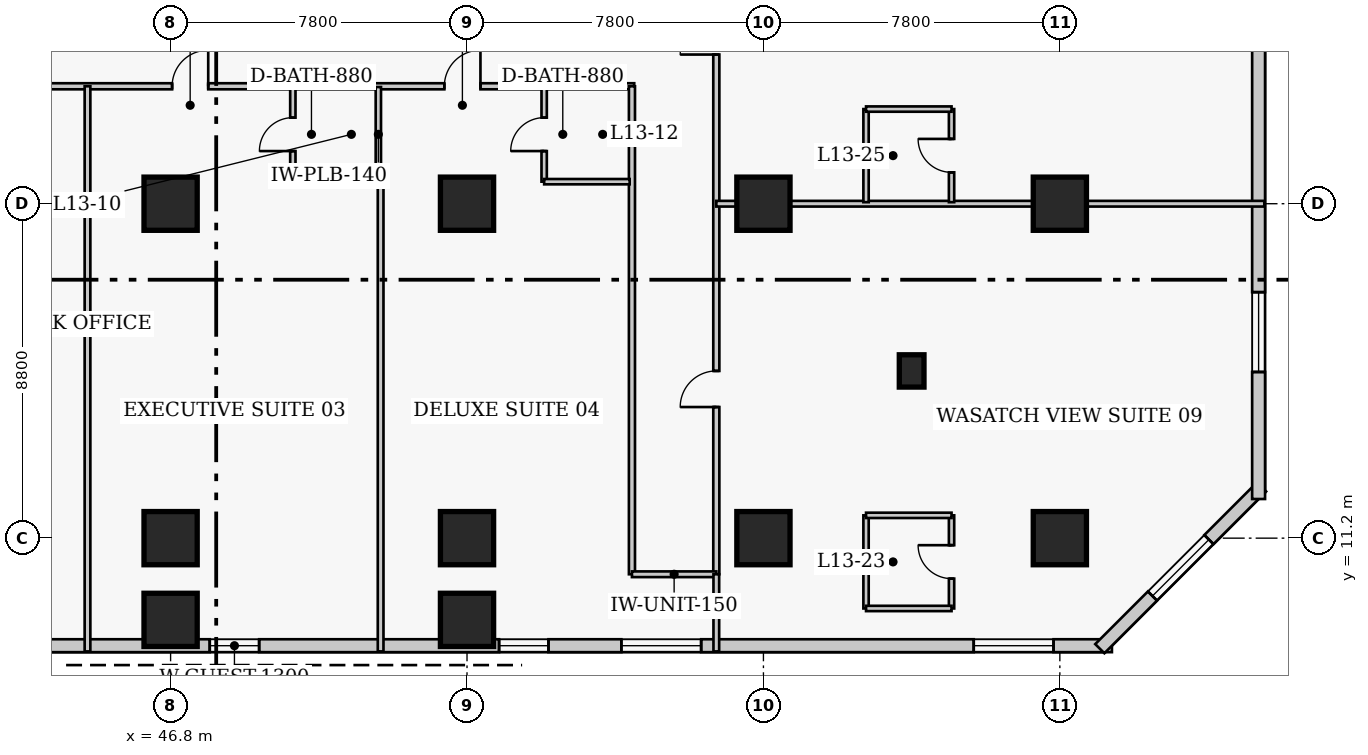
"""IFC4 building model, lengths in metres.
Left out: names, types, materials, properties, quantities, classifications, styles, units other than length and angle.
Written with IfcOpenShell. Run it as: python <this file> out.ifc"""

import sys

from ifc_helpers import new_model, si_unit, direction, frame, frame_2d, origin, origin_2d, place, context, subcontext, project, spatial, rectangle, extrude, element, fill, save


model = new_model("IFC4")
c1 = context("Model", 3, precision=1e-05, world=origin(), true_north=direction((0.0, 1.0)))
c2 = subcontext(c1, "Body", "Model", "MODEL_VIEW")
j1 = project(units=[si_unit("LENGTHUNIT", "METRE"), si_unit("PLANEANGLEUNIT", "RADIAN")], contexts=[c1])
p1 = place(None, origin())
s1 = spatial("IfcSite", under=j1, at=p1, CompositionType="ELEMENT")
p2 = place(p1, origin())
s2 = spatial("IfcBuilding", under=s1, at=p2, CompositionType="ELEMENT")
p3 = place(p2, frame((0.0, 0.0, 56.4)))
s3 = spatial("IfcBuildingStorey", under=s2, at=p3, CompositionType="ELEMENT", Elevation=56.4)
for number, where, z_axis, x_axis in (
    (1, (46.8, 11.2, 0.0), (0.0, 0.0, 1.0), (1.0, 0.0, 0.0)),
    (2, (46.8, 20.0, 0.0), (0.0, 0.0, 1.0), (1.0, 0.0, 0.0)),
    (3, (54.6, 11.2, 0.0), (0.0, 0.0, 1.0), (1.0, 0.0, 0.0)),
    (4, (54.6, 20.0, 0.0), (0.0, 0.0, 1.0), (1.0, 0.0, 0.0)),
    (5, (62.4, 11.2, 0.0), (0.0, 0.0, 1.0), (1.0, 0.0, 0.0)),
    (6, (62.4, 20.0, 0.0), (0.0, 0.0, 1.0), (1.0, 0.0, 0.0)),
    (7, (70.2, 11.2, 0.0), (0.0, 0.0, 1.0), (1.0, 0.0, 0.0)),
    (8, (70.2, 20.0, 0.0), (0.0, 0.0, 1.0), (1.0, 0.0, 0.0)),
    (9, (46.8, 9.05, 0.0), (0.0, 0.0, 1.0), (1.0, 0.0, 0.0)),
    (10, (54.6, 9.05, 0.0), (0.0, 0.0, 1.0), (1.0, 0.0, 0.0)),
):
    element("IfcColumn", number, at=place(p3, frame(where, z_axis=z_axis, x_axis=x_axis)), inside=s3, PredefinedType="COLUMN", context=c2, shape_type="SweptSolid", body=[
        extrude(rectangle(XDim=1.4, YDim=1.4, at=origin_2d()), origin(), (0.0, 0.0, 1.0), 3.8),
    ])
p4 = place(p3, frame((66.3, 15.6, 0.0), z_axis=(0.0, 0.0, 1.0), x_axis=(1.0, 0.0, 0.0)))
e11 = element("IfcColumn", 11, at=p4, inside=s3, PredefinedType="PILASTER", context=c2, shape_type="SweptSolid", body=[
    extrude(rectangle(XDim=0.65, YDim=0.85, at=origin_2d()), origin(), (0.0, 0.0, 1.0), 3.8),
])
p5 = place(p3, frame((41.68, 8.37, 0.0), z_axis=(0.0, 0.0, 1.0), x_axis=(1.0, 0.0, 0.0)))
e12 = element("IfcWall", 12, at=p5, inside=s3, PredefinedType="SOLIDWALL", context=c2, shape_type="SweptSolid", body=[
    extrude(rectangle(XDim=29.89, YDim=0.34, at=frame_2d((14.945, 0.0))), origin(), (0.0, 0.0, 1.0), 3.54),
])
p6 = place(p5, frame((16.981, 0.0, 0.85)))
e13 = element("IfcOpeningElement", 13, at=p6, cuts=e12, PredefinedType="OPENING", context=c2, shape_type="SweptSolid", body=[
    extrude(rectangle(XDim=2.1, YDim=1.85, at=frame_2d((1.05, 0.925))), frame((0.0, 0.18, 0.0), z_axis=(0.0, -1.0, 0.0), x_axis=(1.0, 0.0, 0.0)), (0.0, 0.0, 1.0), 0.36),
])
p7 = place(p5, frame((26.254, 0.0, 0.85)))
e14 = element("IfcOpeningElement", 14, at=p7, cuts=e12, PredefinedType="OPENING", context=c2, shape_type="SweptSolid", body=[
    extrude(rectangle(XDim=2.1, YDim=1.85, at=frame_2d((1.05, 0.925))), frame((0.0, 0.18, 0.0), z_axis=(0.0, -1.0, 0.0), x_axis=(1.0, 0.0, 0.0)), (0.0, 0.0, 1.0), 0.36),
])
p8 = place(p5, frame((6.15, 0.0, 0.85)))
e15 = element("IfcOpeningElement", 15, at=p8, cuts=e12, PredefinedType="OPENING", context=c2, shape_type="SweptSolid", body=[
    extrude(rectangle(XDim=1.3, YDim=1.7, at=frame_2d((0.65, 0.85))), frame((0.0, 0.18, 0.0), z_axis=(0.0, -1.0, 0.0), x_axis=(1.0, 0.0, 0.0)), (0.0, 0.0, 1.0), 0.36),
])
p9 = place(p5, frame((13.763, 0.0, 0.85)))
e16 = element("IfcOpeningElement", 16, at=p9, cuts=e12, PredefinedType="OPENING", context=c2, shape_type="SweptSolid", body=[
    extrude(rectangle(XDim=1.3, YDim=1.7, at=frame_2d((0.65, 0.85))), frame((0.0, 0.18, 0.0), z_axis=(0.0, -1.0, 0.0), x_axis=(1.0, 0.0, 0.0)), (0.0, 0.0, 1.0), 0.36),
])
p10 = place(p3, frame((71.251, 8.292, 0.0), z_axis=(0.0, 0.0, 1.0), x_axis=(0.707106781187, 0.707106781187, 0.0)))
e17 = element("IfcWall", 17, at=p10, inside=s3, PredefinedType="SOLIDWALL", context=c2, shape_type="SweptSolid", body=[
    extrude(rectangle(XDim=6.02, YDim=0.34, at=frame_2d((3.01, 0.0))), origin(), (0.0, 0.0, 1.0), 3.54),
])
p11 = place(p10, frame((1.96, 0.0, 0.85)))
e18 = element("IfcOpeningElement", 18, at=p11, cuts=e17, PredefinedType="OPENING", context=c2, shape_type="SweptSolid", body=[
    extrude(rectangle(XDim=2.1, YDim=1.85, at=frame_2d((1.05, 0.925))), frame((0.0, 0.18, 0.0), z_axis=(0.0, -1.0, 0.0), x_axis=(1.0, 0.0, 0.0)), (0.0, 0.0, 1.0), 0.36),
])
p12 = place(p3, frame((75.43, 12.23, 0.0), z_axis=(0.0, 0.0, 1.0), x_axis=(0.0, 1.0, 0.0)))
e19 = element("IfcWall", 19, at=p12, inside=s3, PredefinedType="SOLIDWALL", context=c2, shape_type="SweptSolid", body=[
    extrude(rectangle(XDim=35.14, YDim=0.34, at=frame_2d((17.57, 0.0))), origin(), (0.0, 0.0, 1.0), 3.54),
])
p13 = place(p12, frame((3.343, 0.0, 0.85)))
e20 = element("IfcOpeningElement", 20, at=p13, cuts=e19, PredefinedType="OPENING", context=c2, shape_type="SweptSolid", body=[
    extrude(rectangle(XDim=2.1, YDim=1.85, at=frame_2d((1.05, 0.925))), frame((0.0, 0.18, 0.0), z_axis=(0.0, -1.0, 0.0), x_axis=(1.0, 0.0, 0.0)), (0.0, 0.0, 1.0), 0.36),
])
p14 = place(p12, frame((12.127, 0.0, 0.85)))
e21 = element("IfcOpeningElement", 21, at=p14, cuts=e19, PredefinedType="OPENING", context=c2, shape_type="SweptSolid", body=[
    extrude(rectangle(XDim=2.1, YDim=1.85, at=frame_2d((1.05, 0.925))), frame((0.0, 0.18, 0.0), z_axis=(0.0, -1.0, 0.0), x_axis=(1.0, 0.0, 0.0)), (0.0, 0.0, 1.0), 0.36),
])
p15 = place(p12, frame((20.913, 0.0, 0.85)))
e22 = element("IfcOpeningElement", 22, at=p15, cuts=e19, PredefinedType="OPENING", context=c2, shape_type="SweptSolid", body=[
    extrude(rectangle(XDim=2.1, YDim=1.85, at=frame_2d((1.05, 0.925))), frame((0.0, 0.18, 0.0), z_axis=(0.0, -1.0, 0.0), x_axis=(1.0, 0.0, 0.0)), (0.0, 0.0, 1.0), 0.36),
])
p16 = place(p12, frame((29.698, 0.0, 0.85)))
e23 = element("IfcOpeningElement", 23, at=p16, cuts=e19, PredefinedType="OPENING", context=c2, shape_type="SweptSolid", body=[
    extrude(rectangle(XDim=2.1, YDim=1.85, at=frame_2d((1.05, 0.925))), frame((0.0, 0.18, 0.0), z_axis=(0.0, -1.0, 0.0), x_axis=(1.0, 0.0, 0.0)), (0.0, 0.0, 1.0), 0.36),
])
p17 = place(p3, frame((35.8, 23.09, 0.0), z_axis=(0.0, 0.0, 1.0), x_axis=(1.0, 0.0, 0.0)))
e24 = element("IfcWall", 24, at=p17, inside=s3, PredefinedType="PARTITIONING", context=c2, shape_type="SweptSolid", body=[
    extrude(rectangle(XDim=23.2, YDim=0.16, at=frame_2d((11.6, 0.0))), origin(), (0.0, 0.0, 1.0), 3.54),
])
p18 = place(p17, frame((3.907, 0.0, 0.0)))
e25 = element("IfcOpeningElement", 25, at=p18, cuts=e24, PredefinedType="OPENING", context=c2, shape_type="SweptSolid", body=[
    extrude(rectangle(XDim=1.0, YDim=2.15, at=frame_2d((0.5, 1.075))), frame((0.0, 0.09, 0.0), z_axis=(0.0, -1.0, 0.0), x_axis=(1.0, 0.0, 0.0)), (0.0, 0.0, 1.0), 0.18),
])
p19 = place(p17, frame((11.04, 0.0, 0.0)))
e26 = element("IfcOpeningElement", 26, at=p19, cuts=e24, PredefinedType="OPENING", context=c2, shape_type="SweptSolid", body=[
    extrude(rectangle(XDim=0.95, YDim=2.1, at=frame_2d((0.475, 1.05))), frame((0.0, 0.09, 0.0), z_axis=(0.0, -1.0, 0.0), x_axis=(1.0, 0.0, 0.0)), (0.0, 0.0, 1.0), 0.18),
])
p20 = place(p17, frame((18.203, 0.0, 0.0)))
e27 = element("IfcOpeningElement", 27, at=p20, cuts=e24, PredefinedType="OPENING", context=c2, shape_type="SweptSolid", body=[
    extrude(rectangle(XDim=0.95, YDim=2.1, at=frame_2d((0.475, 1.05))), frame((0.0, 0.09, 0.0), z_axis=(0.0, -1.0, 0.0), x_axis=(1.0, 0.0, 0.0)), (0.0, 0.0, 1.0), 0.18),
])
p21 = place(p3, frame((61.16, 10.25, 0.0), z_axis=(0.0, 0.0, 1.0), x_axis=(0.0, 1.0, 0.0)))
e28 = element("IfcWall", 28, at=p21, inside=s3, PredefinedType="PARTITIONING", context=c2, shape_type="SweptSolid", body=[
    extrude(rectangle(XDim=30.4, YDim=0.16, at=frame_2d((15.2, 0.0))), origin(), (0.0, 0.0, 1.0), 3.54),
])
p22 = place(p21, frame((4.4, 0.0, 0.0)))
e29 = element("IfcOpeningElement", 29, at=p22, cuts=e28, PredefinedType="OPENING", context=c2, shape_type="SweptSolid", body=[
    extrude(rectangle(XDim=0.95, YDim=2.1, at=frame_2d((0.475, 1.05))), frame((0.0, 0.09, 0.0), z_axis=(0.0, -1.0, 0.0), x_axis=(1.0, 0.0, 0.0)), (0.0, 0.0, 1.0), 0.18),
])
p23 = place(p21, frame((13.675, 0.0, 0.0)))
e30 = element("IfcOpeningElement", 30, at=p23, cuts=e28, PredefinedType="OPENING", context=c2, shape_type="SweptSolid", body=[
    extrude(rectangle(XDim=0.95, YDim=2.1, at=frame_2d((0.475, 1.05))), frame((0.0, 0.09, 0.0), z_axis=(0.0, -1.0, 0.0), x_axis=(1.0, 0.0, 0.0)), (0.0, 0.0, 1.0), 0.18),
])
p24 = place(p21, frame((21.8, 0.0, 0.0)))
e31 = element("IfcOpeningElement", 31, at=p24, cuts=e28, PredefinedType="OPENING", context=c2, shape_type="SweptSolid", body=[
    extrude(rectangle(XDim=0.95, YDim=2.1, at=frame_2d((0.475, 1.05))), frame((0.0, 0.09, 0.0), z_axis=(0.0, -1.0, 0.0), x_axis=(1.0, 0.0, 0.0)), (0.0, 0.0, 1.0), 0.18),
])
p25 = place(p21, frame((28.96, 0.0, 0.0)))
e32 = element("IfcOpeningElement", 32, at=p25, cuts=e28, PredefinedType="OPENING", context=c2, shape_type="SweptSolid", body=[
    extrude(rectangle(XDim=1.0, YDim=2.15, at=frame_2d((0.5, 1.075))), frame((0.0, 0.09, 0.0), z_axis=(0.0, -1.0, 0.0), x_axis=(1.0, 0.0, 0.0)), (0.0, 0.0, 1.0), 0.18),
])
p26 = place(p3, frame((58.94, 10.25, 0.0), z_axis=(0.0, 0.0, 1.0), x_axis=(0.0, 1.0, 0.0)))
e33 = element("IfcWall", 33, at=p26, inside=s3, PredefinedType="PARTITIONING", context=c2, shape_type="SweptSolid", body=[
    extrude(rectangle(XDim=12.84, YDim=0.16, at=frame_2d((6.42, 0.0))), origin(), (0.0, 0.0, 1.0), 3.54),
])
p27 = place(p3, frame((58.94, 10.25, 0.0), z_axis=(0.0, 0.0, 1.0), x_axis=(1.0, 0.0, 0.0)))
e34 = element("IfcWall", 34, at=p27, inside=s3, PredefinedType="PARTITIONING", context=c2, shape_type="SweptSolid", body=[
    extrude(rectangle(XDim=2.22, YDim=0.15, at=frame_2d((1.11, 0.0))), origin(), (0.0, 0.0, 1.0), 3.54),
])
p28 = place(p3, frame((44.613, 8.22, 0.0), z_axis=(0.0, 0.0, 1.0), x_axis=(0.0, 1.0, 0.0)))
e35 = element("IfcWall", 35, at=p28, inside=s3, PredefinedType="PARTITIONING", context=c2, shape_type="SweptSolid", body=[
    extrude(rectangle(XDim=14.87, YDim=0.15, at=frame_2d((7.435, 0.0))), origin(), (0.0, 0.0, 1.0), 3.54),
])
p29 = place(p3, frame((50.017, 20.58, 0.0), z_axis=(0.0, 0.0, 1.0), x_axis=(0.0, 1.0, 0.0)))
e36 = element("IfcWall", 36, at=p29, inside=s3, PredefinedType="PLUMBINGWALL", context=c2, shape_type="SweptSolid", body=[
    extrude(rectangle(XDim=2.49, YDim=0.14, at=frame_2d((1.245, 0.0))), origin(), (0.0, 0.0, 1.0), 3.54),
])
p30 = place(p29, frame((0.805, 0.0, 0.0)))
e37 = element("IfcOpeningElement", 37, at=p30, cuts=e36, PredefinedType="OPENING", context=c2, shape_type="SweptSolid", body=[
    extrude(rectangle(XDim=0.88, YDim=2.05, at=frame_2d((0.44, 1.025))), frame((0.0, 0.08, 0.0), z_axis=(0.0, -1.0, 0.0), x_axis=(1.0, 0.0, 0.0)), (0.0, 0.0, 1.0), 0.16),
])
p31 = place(p3, frame((52.267, 20.58, 0.0), z_axis=(0.0, 0.0, 1.0), x_axis=(0.0, 1.0, 0.0)))
e38 = element("IfcWall", 38, at=p31, inside=s3, PredefinedType="PLUMBINGWALL", context=c2, shape_type="SweptSolid", body=[
    extrude(rectangle(XDim=2.49, YDim=0.14, at=frame_2d((1.245, 0.0))), origin(), (0.0, 0.0, 1.0), 3.54),
])
p32 = place(p3, frame((50.017, 20.58, 0.0), z_axis=(0.0, 0.0, 1.0), x_axis=(1.0, 0.0, 0.0)))
e39 = element("IfcWall", 39, at=p32, inside=s3, PredefinedType="PLUMBINGWALL", context=c2, shape_type="SweptSolid", body=[
    extrude(rectangle(XDim=2.25, YDim=0.14, at=frame_2d((1.125, 0.0))), origin(), (0.0, 0.0, 1.0), 3.54),
])
p33 = place(p3, frame((52.327, 8.22, 0.0), z_axis=(0.0, 0.0, 1.0), x_axis=(0.0, 1.0, 0.0)))
e40 = element("IfcWall", 40, at=p33, inside=s3, PredefinedType="PARTITIONING", context=c2, shape_type="SweptSolid", body=[
    extrude(rectangle(XDim=12.36, YDim=0.15, at=frame_2d((6.18, 0.0))), origin(), (0.0, 0.0, 1.0), 3.54),
])
p34 = place(p3, frame((56.63, 20.58, 0.0), z_axis=(0.0, 0.0, 1.0), x_axis=(0.0, 1.0, 0.0)))
e41 = element("IfcWall", 41, at=p34, inside=s3, PredefinedType="PLUMBINGWALL", context=c2, shape_type="SweptSolid", body=[
    extrude(rectangle(XDim=2.49, YDim=0.14, at=frame_2d((1.245, 0.0))), origin(), (0.0, 0.0, 1.0), 3.54),
])
p35 = place(p34, frame((0.805, 0.0, 0.0)))
e42 = element("IfcOpeningElement", 42, at=p35, cuts=e41, PredefinedType="OPENING", context=c2, shape_type="SweptSolid", body=[
    extrude(rectangle(XDim=0.88, YDim=2.05, at=frame_2d((0.44, 1.025))), frame((0.0, 0.08, 0.0), z_axis=(0.0, -1.0, 0.0), x_axis=(1.0, 0.0, 0.0)), (0.0, 0.0, 1.0), 0.16),
])
p36 = place(p3, frame((56.63, 20.58, 0.0), z_axis=(0.0, 0.0, 1.0), x_axis=(1.0, 0.0, 0.0)))
e43 = element("IfcWall", 43, at=p36, inside=s3, PredefinedType="PLUMBINGWALL", context=c2, shape_type="SweptSolid", body=[
    extrude(rectangle(XDim=2.25, YDim=0.14, at=frame_2d((1.125, 0.0))), origin(), (0.0, 0.0, 1.0), 3.54),
])
p37 = place(p3, frame((61.16, 8.22, 0.0), z_axis=(0.0, 0.0, 1.0), x_axis=(0.0, 1.0, 0.0)))
e44 = element("IfcWall", 44, at=p37, inside=s3, PredefinedType="PARTITIONING", context=c2, shape_type="SweptSolid", body=[
    extrude(rectangle(XDim=2.03, YDim=0.15, at=frame_2d((1.015, 0.0))), origin(), (0.0, 0.0, 1.0), 3.54),
])
p38 = place(p3, frame((65.1, 9.35, 0.0), z_axis=(0.0, 0.0, 1.0), x_axis=(0.0, 1.0, 0.0)))
e45 = element("IfcWall", 45, at=p38, inside=s3, PredefinedType="PLUMBINGWALL", context=c2, shape_type="SweptSolid", body=[
    extrude(rectangle(XDim=2.45, YDim=0.14, at=frame_2d((1.225, 0.0))), origin(), (0.0, 0.0, 1.0), 3.54),
])
p39 = place(p3, frame((67.35, 9.35, 0.0), z_axis=(0.0, 0.0, 1.0), x_axis=(0.0, 1.0, 0.0)))
e46 = element("IfcWall", 46, at=p39, inside=s3, PredefinedType="PLUMBINGWALL", context=c2, shape_type="SweptSolid", body=[
    extrude(rectangle(XDim=2.45, YDim=0.14, at=frame_2d((1.225, 0.0))), origin(), (0.0, 0.0, 1.0), 3.54),
])
p40 = place(p39, frame((0.785, 0.0, 0.0)))
e47 = element("IfcOpeningElement", 47, at=p40, cuts=e46, PredefinedType="OPENING", context=c2, shape_type="SweptSolid", body=[
    extrude(rectangle(XDim=0.88, YDim=2.05, at=frame_2d((0.44, 1.025))), frame((0.0, 0.08, 0.0), z_axis=(0.0, -1.0, 0.0), x_axis=(1.0, 0.0, 0.0)), (0.0, 0.0, 1.0), 0.16),
])
for number, where, z_axis, x_axis in (
    (48, (65.1, 9.35, 0.0), (0.0, 0.0, 1.0), (1.0, 0.0, 0.0)),
    (49, (65.1, 11.8, 0.0), (0.0, 0.0, 1.0), (1.0, 0.0, 0.0)),
):
    element("IfcWall", number, at=place(p3, frame(where, z_axis=z_axis, x_axis=x_axis)), inside=s3, PredefinedType="PLUMBINGWALL", context=c2, shape_type="SweptSolid", body=[
        extrude(rectangle(XDim=2.25, YDim=0.14, at=frame_2d((1.125, 0.0))), origin(), (0.0, 0.0, 1.0), 3.54),
    ])
p41 = place(p3, frame((61.16, 20.0, 0.0), z_axis=(0.0, 0.0, 1.0), x_axis=(1.0, 0.0, 0.0)))
e50 = element("IfcWall", 50, at=p41, inside=s3, PredefinedType="PARTITIONING", context=c2, shape_type="SweptSolid", body=[
    extrude(rectangle(XDim=14.42, YDim=0.15, at=frame_2d((7.21, 0.0))), origin(), (0.0, 0.0, 1.0), 2.593),
])
p42 = place(p3, frame((65.1, 20.04, 0.0), z_axis=(0.0, 0.0, 1.0), x_axis=(0.0, 1.0, 0.0)))
e51 = element("IfcWall", 51, at=p42, inside=s3, PredefinedType="PLUMBINGWALL", context=c2, shape_type="SweptSolid", body=[
    extrude(rectangle(XDim=2.45, YDim=0.14, at=frame_2d((1.225, 0.0))), origin(), (0.0, 0.0, 1.0), 3.54),
])
p43 = place(p3, frame((67.35, 20.04, 0.0), z_axis=(0.0, 0.0, 1.0), x_axis=(0.0, 1.0, 0.0)))
e52 = element("IfcWall", 52, at=p43, inside=s3, PredefinedType="PLUMBINGWALL", context=c2, shape_type="SweptSolid", body=[
    extrude(rectangle(XDim=2.45, YDim=0.14, at=frame_2d((1.225, 0.0))), origin(), (0.0, 0.0, 1.0), 3.54),
])
p44 = place(p43, frame((0.785, 0.0, 0.0)))
e53 = element("IfcOpeningElement", 53, at=p44, cuts=e52, PredefinedType="OPENING", context=c2, shape_type="SweptSolid", body=[
    extrude(rectangle(XDim=0.88, YDim=2.05, at=frame_2d((0.44, 1.025))), frame((0.0, 0.08, 0.0), z_axis=(0.0, -1.0, 0.0), x_axis=(1.0, 0.0, 0.0)), (0.0, 0.0, 1.0), 0.16),
])
p45 = place(p3, frame((65.1, 22.49, 0.0), z_axis=(0.0, 0.0, 1.0), x_axis=(1.0, 0.0, 0.0)))
e54 = element("IfcWall", 54, at=p45, inside=s3, PredefinedType="PLUMBINGWALL", context=c2, shape_type="SweptSolid", body=[
    extrude(rectangle(XDim=2.25, YDim=0.14, at=frame_2d((1.125, 0.0))), origin(), (0.0, 0.0, 1.0), 3.54),
])
p46 = place(p6, origin())
e55 = element("IfcWindow", 55, at=p46, inside=s3, PartitioningType="SINGLE_PANEL", PredefinedType="WINDOW", context=c2, shape_type="SweptSolid", body=[
    extrude(rectangle(XDim=2.1, YDim=1.85, at=frame_2d((1.05, 0.925))), frame((0.0, 0.03, 0.0), z_axis=(0.0, -1.0, 0.0), x_axis=(1.0, 0.0, 0.0)), (0.0, 0.0, 1.0), 0.06),
])
fill(e13, e55)
p47 = place(p7, origin())
e56 = element("IfcWindow", 56, at=p47, inside=s3, PartitioningType="SINGLE_PANEL", PredefinedType="WINDOW", context=c2, shape_type="SweptSolid", body=[
    extrude(rectangle(XDim=2.1, YDim=1.85, at=frame_2d((1.05, 0.925))), frame((0.0, 0.03, 0.0), z_axis=(0.0, -1.0, 0.0), x_axis=(1.0, 0.0, 0.0)), (0.0, 0.0, 1.0), 0.06),
])
fill(e14, e56)
p48 = place(p11, origin())
e57 = element("IfcWindow", 57, at=p48, inside=s3, PartitioningType="SINGLE_PANEL", PredefinedType="WINDOW", context=c2, shape_type="SweptSolid", body=[
    extrude(rectangle(XDim=2.1, YDim=1.85, at=frame_2d((1.05, 0.925))), frame((0.0, 0.03, 0.0), z_axis=(0.0, -1.0, 0.0), x_axis=(1.0, 0.0, 0.0)), (0.0, 0.0, 1.0), 0.06),
])
fill(e18, e57)
p49 = place(p13, origin())
e58 = element("IfcWindow", 58, at=p49, inside=s3, PartitioningType="SINGLE_PANEL", PredefinedType="WINDOW", context=c2, shape_type="SweptSolid", body=[
    extrude(rectangle(XDim=2.1, YDim=1.85, at=frame_2d((1.05, 0.925))), frame((0.0, 0.03, 0.0), z_axis=(0.0, -1.0, 0.0), x_axis=(1.0, 0.0, 0.0)), (0.0, 0.0, 1.0), 0.06),
])
fill(e20, e58)
p50 = place(p8, origin())
e59 = element("IfcWindow", 59, at=p50, inside=s3, PartitioningType="SINGLE_PANEL", PredefinedType="WINDOW", context=c2, shape_type="SweptSolid", body=[
    extrude(rectangle(XDim=1.3, YDim=1.7, at=frame_2d((0.65, 0.85))), frame((0.0, 0.03, 0.0), z_axis=(0.0, -1.0, 0.0), x_axis=(1.0, 0.0, 0.0)), (0.0, 0.0, 1.0), 0.06),
])
fill(e15, e59)
p51 = place(p9, origin())
e60 = element("IfcWindow", 60, at=p51, inside=s3, PartitioningType="SINGLE_PANEL", PredefinedType="WINDOW", context=c2, shape_type="SweptSolid", body=[
    extrude(rectangle(XDim=1.3, YDim=1.7, at=frame_2d((0.65, 0.85))), frame((0.0, 0.03, 0.0), z_axis=(0.0, -1.0, 0.0), x_axis=(1.0, 0.0, 0.0)), (0.0, 0.0, 1.0), 0.06),
])
fill(e16, e60)
p52 = place(p30, origin())
e61 = element("IfcDoor", 61, at=p52, inside=s3, OperationType="SINGLE_SWING_LEFT", PredefinedType="DOOR", context=c2, shape_type="SweptSolid", body=[
    extrude(rectangle(XDim=0.88, YDim=2.05, at=frame_2d((0.44, 1.025))), frame((0.0, 0.025, 0.0), z_axis=(0.0, -1.0, 0.0), x_axis=(1.0, 0.0, 0.0)), (0.0, 0.0, 1.0), 0.05),
])
fill(e37, e61)
p53 = place(p19, origin())
e62 = element("IfcDoor", 62, at=p53, inside=s3, OperationType="SINGLE_SWING_RIGHT", PredefinedType="DOOR", context=c2, shape_type="SweptSolid", body=[
    extrude(rectangle(XDim=0.95, YDim=2.1, at=frame_2d((0.475, 1.05))), frame((0.0, 0.025, 0.0), z_axis=(0.0, -1.0, 0.0), x_axis=(1.0, 0.0, 0.0)), (0.0, 0.0, 1.0), 0.05),
])
fill(e26, e62)
p54 = place(p35, origin())
e63 = element("IfcDoor", 63, at=p54, inside=s3, OperationType="SINGLE_SWING_LEFT", PredefinedType="DOOR", context=c2, shape_type="SweptSolid", body=[
    extrude(rectangle(XDim=0.88, YDim=2.05, at=frame_2d((0.44, 1.025))), frame((0.0, 0.025, 0.0), z_axis=(0.0, -1.0, 0.0), x_axis=(1.0, 0.0, 0.0)), (0.0, 0.0, 1.0), 0.05),
])
fill(e42, e63)
p55 = place(p20, origin())
e64 = element("IfcDoor", 64, at=p55, inside=s3, OperationType="SINGLE_SWING_RIGHT", PredefinedType="DOOR", context=c2, shape_type="SweptSolid", body=[
    extrude(rectangle(XDim=0.95, YDim=2.1, at=frame_2d((0.475, 1.05))), frame((0.0, 0.025, 0.0), z_axis=(0.0, -1.0, 0.0), x_axis=(1.0, 0.0, 0.0)), (0.0, 0.0, 1.0), 0.05),
])
fill(e27, e64)
p56 = place(p40, origin())
e65 = element("IfcDoor", 65, at=p56, inside=s3, OperationType="SINGLE_SWING_RIGHT", PredefinedType="DOOR", context=c2, shape_type="SweptSolid", body=[
    extrude(rectangle(XDim=0.88, YDim=2.05, at=frame_2d((0.44, 1.025))), frame((0.0, 0.025, 0.0), z_axis=(0.0, -1.0, 0.0), x_axis=(1.0, 0.0, 0.0)), (0.0, 0.0, 1.0), 0.05),
])
fill(e47, e65)
p57 = place(p22, origin())
e66 = element("IfcDoor", 66, at=p57, inside=s3, OperationType="SINGLE_SWING_LEFT", PredefinedType="DOOR", context=c2, shape_type="SweptSolid", body=[
    extrude(rectangle(XDim=0.95, YDim=2.1, at=frame_2d((0.475, 1.05))), frame((0.0, 0.025, 0.0), z_axis=(0.0, -1.0, 0.0), x_axis=(1.0, 0.0, 0.0)), (0.0, 0.0, 1.0), 0.05),
])
fill(e29, e66)
p58 = place(p44, origin())
e67 = element("IfcDoor", 67, at=p58, inside=s3, OperationType="SINGLE_SWING_RIGHT", PredefinedType="DOOR", context=c2, shape_type="SweptSolid", body=[
    extrude(rectangle(XDim=0.88, YDim=2.05, at=frame_2d((0.44, 1.025))), frame((0.0, 0.025, 0.0), z_axis=(0.0, -1.0, 0.0), x_axis=(1.0, 0.0, 0.0)), (0.0, 0.0, 1.0), 0.05),
])
fill(e53, e67)
p59 = place(p23, origin())
e68 = element("IfcDoor", 68, at=p59, inside=s3, OperationType="SINGLE_SWING_LEFT", PredefinedType="DOOR", context=c2, shape_type="SweptSolid", body=[
    extrude(rectangle(XDim=0.95, YDim=2.1, at=frame_2d((0.475, 1.05))), frame((0.0, 0.025, 0.0), z_axis=(0.0, -1.0, 0.0), x_axis=(1.0, 0.0, 0.0)), (0.0, 0.0, 1.0), 0.05),
])
fill(e30, e68)
save(model, sys.argv[1])
